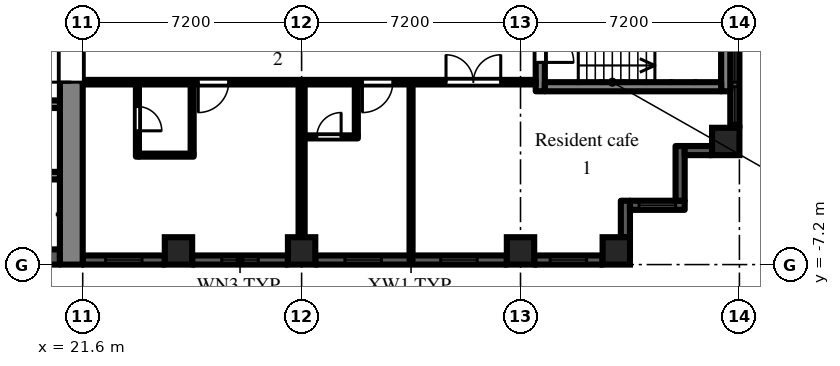
"""IFC4 building model, lengths in metres.
Left out: names, types, materials, properties, quantities, classifications, styles, units other than length and angle.
Written with IfcOpenShell. Run it as: python <this file> out.ifc"""

import sys

from ifc_helpers import new_model, si_unit, direction, frame, frame_2d, origin, origin_2d, place, context, subcontext, project, spatial, rectangle, extrude, element, fill, save


model = new_model("IFC4")
c1 = context("Model", 3, precision=1e-05, world=origin(), true_north=direction((0.0, 1.0)))
c2 = subcontext(c1, "Body", "Model", "MODEL_VIEW")
j1 = project(units=[si_unit("LENGTHUNIT", "METRE"), si_unit("PLANEANGLEUNIT", "RADIAN")], contexts=[c1])
p1 = place(None, origin())
s1 = spatial("IfcSite", under=j1, at=p1, CompositionType="ELEMENT")
p2 = place(p1, origin())
s2 = spatial("IfcBuilding", under=s1, at=p2, CompositionType="ELEMENT")
p3 = place(p2, frame((0.0, 0.0, 35.7)))
s3 = spatial("IfcBuildingStorey", under=s2, at=p3, CompositionType="ELEMENT", Elevation=35.7)
for number, where, z_axis, x_axis in (
    (1, (24.75, -6.75, 0.0), (0.0, 0.0, 1.0), (1.0, 0.0, 0.0)),
    (2, (28.8, -6.75, 0.0), (0.0, 0.0, 1.0), (1.0, 0.0, 0.0)),
    (3, (36.0, -6.75, 0.0), (0.0, 0.0, 1.0), (1.0, 0.0, 0.0)),
    (4, (39.15, -6.75, 0.0), (0.0, 0.0, 1.0), (1.0, 0.0, 0.0)),
    (5, (42.75, -3.15, 0.0), (0.0, 0.0, 1.0), (1.0, 0.0, 0.0)),
):
    element("IfcColumn", number, at=place(p3, frame(where, z_axis=z_axis, x_axis=x_axis)), inside=s3, PredefinedType="COLUMN", context=c2, shape_type="SweptSolid", body=[
        extrude(rectangle(XDim=0.9, YDim=0.9, at=origin_2d()), origin(), (0.0, 0.0, 1.0), 3.0),
    ])
p4 = place(p3, frame((21.6, -7.05, 0.0), z_axis=(0.0, 0.0, 1.0), x_axis=(1.0, 0.0, 0.0)))
e6 = element("IfcWall", 6, at=p4, inside=s3, PredefinedType="SOLIDWALL", context=c2, shape_type="SweptSolid", body=[
    extrude(rectangle(XDim=2.7, YDim=0.3, at=frame_2d((1.35, 0.0))), origin(), (0.0, 0.0, 1.0), 2.1),
])
p5 = place(p4, frame((0.75, 0.0, 0.2)))
e7 = element("IfcOpeningElement", 7, at=p5, cuts=e6, PredefinedType="OPENING", context=c2, shape_type="SweptSolid", body=[
    extrude(rectangle(XDim=1.2, YDim=1.85, at=frame_2d((0.6, 0.925))), frame((0.0, 0.16, 0.0), z_axis=(0.0, -1.0, 0.0), x_axis=(1.0, 0.0, 0.0)), (0.0, 0.0, 1.0), 0.32),
])
p6 = place(p3, frame((25.2, -7.05, 0.0), z_axis=(0.0, 0.0, 1.0), x_axis=(1.0, 0.0, 0.0)))
e8 = element("IfcWall", 8, at=p6, inside=s3, PredefinedType="SOLIDWALL", context=c2, shape_type="SweptSolid", body=[
    extrude(rectangle(XDim=3.15, YDim=0.3, at=frame_2d((1.575, 0.0))), origin(), (0.0, 0.0, 1.0), 2.1),
])
p7 = place(p6, frame((0.975, 0.0, 0.2)))
e9 = element("IfcOpeningElement", 9, at=p7, cuts=e8, PredefinedType="OPENING", context=c2, shape_type="SweptSolid", body=[
    extrude(rectangle(XDim=1.2, YDim=1.85, at=frame_2d((0.6, 0.925))), frame((0.0, 0.16, 0.0), z_axis=(0.0, -1.0, 0.0), x_axis=(1.0, 0.0, 0.0)), (0.0, 0.0, 1.0), 0.32),
])
p8 = place(p3, frame((29.25, -7.05, 0.0), z_axis=(0.0, 0.0, 1.0), x_axis=(1.0, 0.0, 0.0)))
e10 = element("IfcWall", 10, at=p8, inside=s3, PredefinedType="SOLIDWALL", context=c2, shape_type="SweptSolid", body=[
    extrude(rectangle(XDim=6.3, YDim=0.3, at=frame_2d((3.15, 0.0))), origin(), (0.0, 0.0, 1.0), 2.1),
])
p9 = place(p8, frame((0.975, 0.0, 0.2)))
e11 = element("IfcOpeningElement", 11, at=p9, cuts=e10, PredefinedType="OPENING", context=c2, shape_type="SweptSolid", body=[
    extrude(rectangle(XDim=1.2, YDim=1.85, at=frame_2d((0.6, 0.925))), frame((0.0, 0.16, 0.0), z_axis=(0.0, -1.0, 0.0), x_axis=(1.0, 0.0, 0.0)), (0.0, 0.0, 1.0), 0.32),
])
p10 = place(p8, frame((4.125, 0.0, 0.2)))
e12 = element("IfcOpeningElement", 12, at=p10, cuts=e10, PredefinedType="OPENING", context=c2, shape_type="SweptSolid", body=[
    extrude(rectangle(XDim=1.2, YDim=1.85, at=frame_2d((0.6, 0.925))), frame((0.0, 0.16, 0.0), z_axis=(0.0, -1.0, 0.0), x_axis=(1.0, 0.0, 0.0)), (0.0, 0.0, 1.0), 0.32),
])
p11 = place(p3, frame((36.45, -7.05, 0.0), z_axis=(0.0, 0.0, 1.0), x_axis=(1.0, 0.0, 0.0)))
e13 = element("IfcWall", 13, at=p11, inside=s3, PredefinedType="SOLIDWALL", context=c2, shape_type="SweptSolid", body=[
    extrude(rectangle(XDim=2.25, YDim=0.3, at=frame_2d((1.125, 0.0))), origin(), (0.0, 0.0, 1.0), 2.1),
])
p12 = place(p11, frame((0.525, 0.0, 0.2)))
e14 = element("IfcOpeningElement", 14, at=p12, cuts=e13, PredefinedType="OPENING", context=c2, shape_type="SweptSolid", body=[
    extrude(rectangle(XDim=1.2, YDim=1.85, at=frame_2d((0.6, 0.925))), frame((0.0, 0.16, 0.0), z_axis=(0.0, -1.0, 0.0), x_axis=(1.0, 0.0, 0.0)), (0.0, 0.0, 1.0), 0.32),
])
p13 = place(p3, frame((39.45, -6.3, 0.0), z_axis=(0.0, 0.0, 1.0), x_axis=(0.0, 1.0, 0.0)))
e15 = element("IfcWall", 15, at=p13, inside=s3, PredefinedType="SOLIDWALL", context=c2, shape_type="SweptSolid", body=[
    extrude(rectangle(XDim=1.2, YDim=0.3, at=frame_2d((0.6, 0.0))), origin(), (0.0, 0.0, 1.0), 2.575),
])
p14 = place(p3, frame((39.6, -5.25, 0.0), z_axis=(0.0, 0.0, 1.0), x_axis=(1.0, 0.0, 0.0)))
e16 = element("IfcWall", 16, at=p14, inside=s3, PredefinedType="SOLIDWALL", context=c2, shape_type="SweptSolid", body=[
    extrude(rectangle(XDim=1.8, YDim=0.3, at=frame_2d((0.9, 0.0))), origin(), (0.0, 0.0, 1.0), 2.575),
])
p15 = place(p14, frame((0.3, 0.0, 0.2)))
e17 = element("IfcOpeningElement", 17, at=p15, cuts=e16, PredefinedType="OPENING", context=c2, shape_type="SweptSolid", body=[
    extrude(rectangle(XDim=1.2, YDim=1.85, at=frame_2d((0.6, 0.925))), frame((0.0, 0.16, 0.0), z_axis=(0.0, -1.0, 0.0), x_axis=(1.0, 0.0, 0.0)), (0.0, 0.0, 1.0), 0.32),
])
p16 = place(p3, frame((41.25, -5.1, 0.0), z_axis=(0.0, 0.0, 1.0), x_axis=(0.0, 1.0, 0.0)))
e18 = element("IfcWall", 18, at=p16, inside=s3, PredefinedType="SOLIDWALL", context=c2, shape_type="SweptSolid", body=[
    extrude(rectangle(XDim=1.8, YDim=0.3, at=frame_2d((0.9, 0.0))), origin(), (0.0, 0.0, 1.0), 2.575),
])
p17 = place(p3, frame((41.4, -3.45, 0.0), z_axis=(0.0, 0.0, 1.0), x_axis=(1.0, 0.0, 0.0)))
e19 = element("IfcWall", 19, at=p17, inside=s3, PredefinedType="SOLIDWALL", context=c2, shape_type="SweptSolid", body=[
    extrude(rectangle(XDim=0.9, YDim=0.3, at=frame_2d((0.45, 0.0))), origin(), (0.0, 0.0, 1.0), 2.575),
])
p18 = place(p3, frame((43.05, -2.7, 0.0), z_axis=(0.0, 0.0, 1.0), x_axis=(0.0, 1.0, 0.0)))
e20 = element("IfcWall", 20, at=p18, inside=s3, PredefinedType="SOLIDWALL", context=c2, shape_type="SweptSolid", body=[
    extrude(rectangle(XDim=5.4, YDim=0.3, at=frame_2d((2.7, 0.0))), origin(), (0.0, 0.0, 1.0), 2.1),
])
p19 = place(p18, frame((1.5, 0.0, 0.2)))
e21 = element("IfcOpeningElement", 21, at=p19, cuts=e20, PredefinedType="OPENING", context=c2, shape_type="SweptSolid", body=[
    extrude(rectangle(XDim=2.4, YDim=1.85, at=frame_2d((1.2, 0.925))), frame((0.0, 0.16, 0.0), z_axis=(0.0, -1.0, 0.0), x_axis=(1.0, 0.0, 0.0)), (0.0, 0.0, 1.0), 0.32),
])
p20 = place(p18, frame((0.15, 0.0, 0.2)))
e22 = element("IfcOpeningElement", 22, at=p20, cuts=e20, PredefinedType="OPENING", context=c2, shape_type="SweptSolid", body=[
    extrude(rectangle(XDim=1.2, YDim=1.85, at=frame_2d((0.6, 0.925))), frame((0.0, 0.16, 0.0), z_axis=(0.0, -1.0, 0.0), x_axis=(1.0, 0.0, 0.0)), (0.0, 0.0, 1.0), 0.32),
])
p21 = place(p3, frame((21.225, -7.2, 0.0), z_axis=(0.0, 0.0, 1.0), x_axis=(0.0, 1.0, 0.0)))
e23 = element("IfcWall", 23, at=p21, inside=s3, PredefinedType="SHEAR", context=c2, shape_type="SweptSolid", body=[
    extrude(rectangle(XDim=14.4, YDim=0.75, at=frame_2d((7.2, 0.0))), origin(), (0.0, 0.0, 1.0), 2.575),
])
p22 = place(p21, frame((6.0, 0.0, 0.0)))
e24 = element("IfcOpeningElement", 24, at=p22, cuts=e23, PredefinedType="OPENING", context=c2, shape_type="SweptSolid", body=[
    extrude(rectangle(XDim=2.4, YDim=2.2, at=frame_2d((1.2, 1.1))), frame((0.0, 0.385, 0.0), z_axis=(0.0, -1.0, 0.0), x_axis=(1.0, 0.0, 0.0)), (0.0, 0.0, 1.0), 0.77),
])
p23 = place(p3, frame((7.9, -6.95, 0.0), z_axis=(0.0, 0.0, 1.0), x_axis=(1.0, 0.0, 0.0)))
e25 = element("IfcWall", 25, at=p23, inside=s3, PredefinedType="SHEAR", context=c2, shape_type="SweptSolid", body=[
    extrude(rectangle(XDim=12.95, YDim=0.5, at=frame_2d((6.475, 0.0))), origin(), (0.0, 0.0, 1.0), 2.575),
])
p24 = place(p3, frame((7.9, -1.925, 0.0), z_axis=(0.0, 0.0, 1.0), x_axis=(1.0, 0.0, 0.0)))
e26 = element("IfcWall", 26, at=p24, inside=s3, PredefinedType="SHEAR", context=c2, shape_type="SweptSolid", body=[
    extrude(rectangle(XDim=12.95, YDim=0.25, at=frame_2d((6.475, 0.0))), origin(), (0.0, 0.0, 1.0), 2.575),
])
p25 = place(p24, frame((4.825, 0.0, 0.0)))
e27 = element("IfcOpeningElement", 27, at=p25, cuts=e26, PredefinedType="OPENING", context=c2, shape_type="SweptSolid", body=[
    extrude(rectangle(XDim=1.1, YDim=2.1, at=frame_2d((0.55, 1.05))), frame((0.0, 0.135, 0.0), z_axis=(0.0, -1.0, 0.0), x_axis=(1.0, 0.0, 0.0)), (0.0, 0.0, 1.0), 0.27),
])
p26 = place(p24, frame((7.025, 0.0, 0.0)))
e28 = element("IfcOpeningElement", 28, at=p26, cuts=e26, PredefinedType="OPENING", context=c2, shape_type="SweptSolid", body=[
    extrude(rectangle(XDim=1.1, YDim=2.1, at=frame_2d((0.55, 1.05))), frame((0.0, 0.135, 0.0), z_axis=(0.0, -1.0, 0.0), x_axis=(1.0, 0.0, 0.0)), (0.0, 0.0, 1.0), 0.27),
])
p27 = place(p24, frame((9.225, 0.0, 0.0)))
e29 = element("IfcOpeningElement", 29, at=p27, cuts=e26, PredefinedType="OPENING", context=c2, shape_type="SweptSolid", body=[
    extrude(rectangle(XDim=1.1, YDim=2.1, at=frame_2d((0.55, 1.05))), frame((0.0, 0.135, 0.0), z_axis=(0.0, -1.0, 0.0), x_axis=(1.0, 0.0, 0.0)), (0.0, 0.0, 1.0), 0.27),
])
p28 = place(p24, frame((0.525, 0.0, 0.0)))
e30 = element("IfcOpeningElement", 30, at=p28, cuts=e26, PredefinedType="OPENING", context=c2, shape_type="SweptSolid", body=[
    extrude(rectangle(XDim=0.9, YDim=2.1, at=frame_2d((0.45, 1.05))), frame((0.0, 0.135, 0.0), z_axis=(0.0, -1.0, 0.0), x_axis=(1.0, 0.0, 0.0)), (0.0, 0.0, 1.0), 0.27),
])
p29 = place(p24, frame((2.625, 0.0, 0.0)))
e31 = element("IfcOpeningElement", 31, at=p29, cuts=e26, PredefinedType="OPENING", context=c2, shape_type="SweptSolid", body=[
    extrude(rectangle(XDim=1.1, YDim=2.1, at=frame_2d((0.55, 1.05))), frame((0.0, 0.135, 0.0), z_axis=(0.0, -1.0, 0.0), x_axis=(1.0, 0.0, 0.0)), (0.0, 0.0, 1.0), 0.27),
])
p30 = place(p3, frame((12.3, -4.275, 0.0), z_axis=(0.0, 0.0, 1.0), x_axis=(1.0, 0.0, 0.0)))
e32 = element("IfcWall", 32, at=p30, inside=s3, PredefinedType="SHEAR", context=c2, shape_type="SweptSolid", body=[
    extrude(rectangle(XDim=8.55, YDim=0.25, at=frame_2d((4.275, 0.0))), origin(), (0.0, 0.0, 1.0), 2.575),
])
p31 = place(p3, frame((36.65, -1.5, 0.0), z_axis=(0.0, 0.0, 1.0), x_axis=(0.0, 1.0, 0.0)))
e33 = element("IfcWall", 33, at=p31, inside=s3, PredefinedType="SHEAR", context=c2, shape_type="SweptSolid", body=[
    extrude(rectangle(XDim=3.0, YDim=0.3, at=frame_2d((1.5, 0.0))), origin(), (0.0, 0.0, 1.0), 2.575),
])
p32 = place(p31, frame((0.95, 0.0, 0.0)))
e34 = element("IfcOpeningElement", 34, at=p32, cuts=e33, PredefinedType="OPENING", context=c2, shape_type="SweptSolid", body=[
    extrude(rectangle(XDim=1.1, YDim=2.1, at=frame_2d((0.55, 1.05))), frame((0.0, 0.16, 0.0), z_axis=(0.0, -1.0, 0.0), x_axis=(1.0, 0.0, 0.0)), (0.0, 0.0, 1.0), 0.32),
])
p33 = place(p3, frame((42.75, -1.5, 0.0), z_axis=(0.0, 0.0, 1.0), x_axis=(0.0, 1.0, 0.0)))
e35 = element("IfcWall", 35, at=p33, inside=s3, PredefinedType="SHEAR", context=c2, shape_type="SweptSolid", body=[
    extrude(rectangle(XDim=3.0, YDim=0.3, at=frame_2d((1.5, 0.0))), origin(), (0.0, 0.0, 1.0), 2.575),
])
p34 = place(p3, frame((36.8, -1.35, 0.0), z_axis=(0.0, 0.0, 1.0), x_axis=(1.0, 0.0, 0.0)))
e36 = element("IfcWall", 36, at=p34, inside=s3, PredefinedType="SHEAR", context=c2, shape_type="SweptSolid", body=[
    extrude(rectangle(XDim=5.8, YDim=0.3, at=frame_2d((2.9, 0.0))), origin(), (0.0, 0.0, 1.0), 2.575),
])
p35 = place(p3, frame((21.6, -1.2, 0.0), z_axis=(0.0, 0.0, 1.0), x_axis=(1.0, 0.0, 0.0)))
e37 = element("IfcWall", 37, at=p35, inside=s3, PredefinedType="PARTITIONING", context=c2, shape_type="SweptSolid", body=[
    extrude(rectangle(XDim=14.9, YDim=0.15, at=frame_2d((7.45, 0.0))), origin(), (0.0, 0.0, 1.0), 2.575),
])
p36 = place(p35, frame((3.8, 0.0, 0.0)))
e38 = element("IfcOpeningElement", 38, at=p36, cuts=e37, PredefinedType="OPENING", context=c2, shape_type="SweptSolid", body=[
    extrude(rectangle(XDim=1.0, YDim=2.1, at=frame_2d((0.5, 1.05))), frame((0.0, 0.085, 0.0), z_axis=(0.0, -1.0, 0.0), x_axis=(1.0, 0.0, 0.0)), (0.0, 0.0, 1.0), 0.17),
])
p37 = place(p35, frame((9.2, 0.0, 0.0)))
e39 = element("IfcOpeningElement", 39, at=p37, cuts=e37, PredefinedType="OPENING", context=c2, shape_type="SweptSolid", body=[
    extrude(rectangle(XDim=1.0, YDim=2.1, at=frame_2d((0.5, 1.05))), frame((0.0, 0.085, 0.0), z_axis=(0.0, -1.0, 0.0), x_axis=(1.0, 0.0, 0.0)), (0.0, 0.0, 1.0), 0.17),
])
p38 = place(p35, frame((11.95, 0.0, 0.0)))
e40 = element("IfcOpeningElement", 40, at=p38, cuts=e37, PredefinedType="OPENING", context=c2, shape_type="SweptSolid", body=[
    extrude(rectangle(XDim=1.8, YDim=2.1, at=frame_2d((0.9, 1.05))), frame((0.0, 0.085, 0.0), z_axis=(0.0, -1.0, 0.0), x_axis=(1.0, 0.0, 0.0)), (0.0, 0.0, 1.0), 0.17),
])
p39 = place(p3, frame((23.4, -3.65, 0.0), z_axis=(0.0, 0.0, 1.0), x_axis=(0.0, 1.0, 0.0)))
e41 = element("IfcWall", 41, at=p39, inside=s3, PredefinedType="PARTITIONING", context=c2, shape_type="SweptSolid", body=[
    extrude(rectangle(XDim=2.375, YDim=0.1, at=frame_2d((1.188, 0.0))), origin(), (0.0, 0.0, 1.0), 2.575),
])
p40 = place(p39, frame((0.85, 0.0, 0.0)))
e42 = element("IfcOpeningElement", 42, at=p40, cuts=e41, PredefinedType="OPENING", context=c2, shape_type="SweptSolid", body=[
    extrude(rectangle(XDim=0.8, YDim=2.1, at=frame_2d((0.4, 1.05))), frame((0.0, 0.06, 0.0), z_axis=(0.0, -1.0, 0.0), x_axis=(1.0, 0.0, 0.0)), (0.0, 0.0, 1.0), 0.12),
])
p41 = place(p3, frame((23.45, -3.6, 0.0), z_axis=(0.0, 0.0, 1.0), x_axis=(1.0, 0.0, 0.0)))
e43 = element("IfcWall", 43, at=p41, inside=s3, PredefinedType="PARTITIONING", context=c2, shape_type="SweptSolid", body=[
    extrude(rectangle(XDim=1.8, YDim=0.1, at=frame_2d((0.9, 0.0))), origin(), (0.0, 0.0, 1.0), 2.575),
])
p42 = place(p3, frame((25.2, -3.55, 0.0), z_axis=(0.0, 0.0, 1.0), x_axis=(0.0, 1.0, 0.0)))
e44 = element("IfcWall", 44, at=p42, inside=s3, PredefinedType="PARTITIONING", context=c2, shape_type="SweptSolid", body=[
    extrude(rectangle(XDim=2.275, YDim=0.1, at=frame_2d((1.138, 0.0))), origin(), (0.0, 0.0, 1.0), 2.575),
])
p43 = place(p3, frame((28.8, -6.9, 0.0), z_axis=(0.0, 0.0, 1.0), x_axis=(0.0, 1.0, 0.0)))
e45 = element("IfcWall", 45, at=p43, inside=s3, PredefinedType="PARTITIONING", context=c2, shape_type="SweptSolid", body=[
    extrude(rectangle(XDim=5.625, YDim=0.2, at=frame_2d((2.812, 0.0))), origin(), (0.0, 0.0, 1.0), 2.575),
])
p44 = place(p3, frame((28.9, -3.0, 0.0), z_axis=(0.0, 0.0, 1.0), x_axis=(1.0, 0.0, 0.0)))
e46 = element("IfcWall", 46, at=p44, inside=s3, PredefinedType="PARTITIONING", context=c2, shape_type="SweptSolid", body=[
    extrude(rectangle(XDim=1.75, YDim=0.1, at=frame_2d((0.875, 0.0))), origin(), (0.0, 0.0, 1.0), 2.575),
])
p45 = place(p44, frame((0.4, 0.0, 0.0)))
e47 = element("IfcOpeningElement", 47, at=p45, cuts=e46, PredefinedType="OPENING", context=c2, shape_type="SweptSolid", body=[
    extrude(rectangle(XDim=0.8, YDim=2.1, at=frame_2d((0.4, 1.05))), frame((0.0, 0.06, 0.0), z_axis=(0.0, -1.0, 0.0), x_axis=(1.0, 0.0, 0.0)), (0.0, 0.0, 1.0), 0.12),
])
p46 = place(p3, frame((30.6, -2.95, 0.0), z_axis=(0.0, 0.0, 1.0), x_axis=(0.0, 1.0, 0.0)))
e48 = element("IfcWall", 48, at=p46, inside=s3, PredefinedType="PARTITIONING", context=c2, shape_type="SweptSolid", body=[
    extrude(rectangle(XDim=1.675, YDim=0.1, at=frame_2d((0.837, 0.0))), origin(), (0.0, 0.0, 1.0), 2.575),
])
p47 = place(p3, frame((32.4, -6.9, 0.0), z_axis=(0.0, 0.0, 1.0), x_axis=(0.0, 1.0, 0.0)))
e49 = element("IfcWall", 49, at=p47, inside=s3, PredefinedType="PARTITIONING", context=c2, shape_type="SweptSolid", body=[
    extrude(rectangle(XDim=5.625, YDim=0.1, at=frame_2d((2.812, 0.0))), origin(), (0.0, 0.0, 1.0), 2.575),
])
p48 = place(p5, origin())
e50 = element("IfcWindow", 50, at=p48, inside=s3, PartitioningType="SINGLE_PANEL", PredefinedType="WINDOW", context=c2, shape_type="SweptSolid", body=[
    extrude(rectangle(XDim=1.2, YDim=1.85, at=frame_2d((0.6, 0.925))), frame((0.0, 0.03, 0.0), z_axis=(0.0, -1.0, 0.0), x_axis=(1.0, 0.0, 0.0)), (0.0, 0.0, 1.0), 0.06),
])
fill(e7, e50)
p49 = place(p7, origin())
e51 = element("IfcWindow", 51, at=p49, inside=s3, PartitioningType="SINGLE_PANEL", PredefinedType="WINDOW", context=c2, shape_type="SweptSolid", body=[
    extrude(rectangle(XDim=1.2, YDim=1.85, at=frame_2d((0.6, 0.925))), frame((0.0, 0.03, 0.0), z_axis=(0.0, -1.0, 0.0), x_axis=(1.0, 0.0, 0.0)), (0.0, 0.0, 1.0), 0.06),
])
fill(e9, e51)
p50 = place(p9, origin())
e52 = element("IfcWindow", 52, at=p50, inside=s3, PartitioningType="SINGLE_PANEL", PredefinedType="WINDOW", context=c2, shape_type="SweptSolid", body=[
    extrude(rectangle(XDim=1.2, YDim=1.85, at=frame_2d((0.6, 0.925))), frame((0.0, 0.03, 0.0), z_axis=(0.0, -1.0, 0.0), x_axis=(1.0, 0.0, 0.0)), (0.0, 0.0, 1.0), 0.06),
])
fill(e11, e52)
p51 = place(p10, origin())
e53 = element("IfcWindow", 53, at=p51, inside=s3, PartitioningType="SINGLE_PANEL", PredefinedType="WINDOW", context=c2, shape_type="SweptSolid", body=[
    extrude(rectangle(XDim=1.2, YDim=1.85, at=frame_2d((0.6, 0.925))), frame((0.0, 0.03, 0.0), z_axis=(0.0, -1.0, 0.0), x_axis=(1.0, 0.0, 0.0)), (0.0, 0.0, 1.0), 0.06),
])
fill(e12, e53)
p52 = place(p12, origin())
e54 = element("IfcWindow", 54, at=p52, inside=s3, PartitioningType="SINGLE_PANEL", PredefinedType="WINDOW", context=c2, shape_type="SweptSolid", body=[
    extrude(rectangle(XDim=1.2, YDim=1.85, at=frame_2d((0.6, 0.925))), frame((0.0, 0.03, 0.0), z_axis=(0.0, -1.0, 0.0), x_axis=(1.0, 0.0, 0.0)), (0.0, 0.0, 1.0), 0.06),
])
fill(e14, e54)
p53 = place(p15, origin())
e55 = element("IfcWindow", 55, at=p53, inside=s3, PartitioningType="SINGLE_PANEL", PredefinedType="WINDOW", context=c2, shape_type="SweptSolid", body=[
    extrude(rectangle(XDim=1.2, YDim=1.85, at=frame_2d((0.6, 0.925))), frame((0.0, 0.03, 0.0), z_axis=(0.0, -1.0, 0.0), x_axis=(1.0, 0.0, 0.0)), (0.0, 0.0, 1.0), 0.06),
])
fill(e17, e55)
p54 = place(p19, origin())
e56 = element("IfcWindow", 56, at=p54, inside=s3, PartitioningType="SINGLE_PANEL", PredefinedType="WINDOW", context=c2, shape_type="SweptSolid", body=[
    extrude(rectangle(XDim=2.4, YDim=1.85, at=frame_2d((1.2, 0.925))), frame((0.0, 0.03, 0.0), z_axis=(0.0, -1.0, 0.0), x_axis=(1.0, 0.0, 0.0)), (0.0, 0.0, 1.0), 0.06),
])
fill(e21, e56)
p55 = place(p20, origin())
e57 = element("IfcWindow", 57, at=p55, inside=s3, PartitioningType="SINGLE_PANEL", PredefinedType="WINDOW", context=c2, shape_type="SweptSolid", body=[
    extrude(rectangle(XDim=1.2, YDim=1.85, at=frame_2d((0.6, 0.925))), frame((0.0, 0.03, 0.0), z_axis=(0.0, -1.0, 0.0), x_axis=(1.0, 0.0, 0.0)), (0.0, 0.0, 1.0), 0.06),
])
fill(e22, e57)
p56 = place(p22, origin())
e58 = element("IfcDoor", 58, at=p56, inside=s3, OperationType="DOUBLE_DOOR_DOUBLE_SWING", PredefinedType="DOOR", context=c2, shape_type="SweptSolid", body=[
    extrude(rectangle(XDim=2.4, YDim=2.2, at=frame_2d((1.2, 1.1))), frame((0.0, 0.025, 0.0), z_axis=(0.0, -1.0, 0.0), x_axis=(1.0, 0.0, 0.0)), (0.0, 0.0, 1.0), 0.05),
])
fill(e24, e58)
p57 = place(p32, frame((1.1, 0.0, 0.0), z_axis=(0.0, 0.0, 1.0), x_axis=(-1.0, 0.0, 0.0)))
e59 = element("IfcDoor", 59, at=p57, inside=s3, OperationType="SINGLE_SWING_RIGHT", PredefinedType="DOOR", context=c2, shape_type="SweptSolid", body=[
    extrude(rectangle(XDim=1.1, YDim=2.1, at=frame_2d((0.55, 1.05))), frame((0.0, 0.025, 0.0), z_axis=(0.0, -1.0, 0.0), x_axis=(1.0, 0.0, 0.0)), (0.0, 0.0, 1.0), 0.05),
])
fill(e34, e59)
p58 = place(p40, frame((0.8, 0.0, 0.0), z_axis=(0.0, 0.0, 1.0), x_axis=(-1.0, 0.0, 0.0)))
e60 = element("IfcDoor", 60, at=p58, inside=s3, OperationType="SINGLE_SWING_RIGHT", PredefinedType="DOOR", context=c2, shape_type="SweptSolid", body=[
    extrude(rectangle(XDim=0.8, YDim=2.1, at=frame_2d((0.4, 1.05))), frame((0.0, 0.025, 0.0), z_axis=(0.0, -1.0, 0.0), x_axis=(1.0, 0.0, 0.0)), (0.0, 0.0, 1.0), 0.05),
])
fill(e42, e60)
p59 = place(p36, frame((1.0, 0.0, 0.0), z_axis=(0.0, 0.0, 1.0), x_axis=(-1.0, 0.0, 0.0)))
e61 = element("IfcDoor", 61, at=p59, inside=s3, OperationType="SINGLE_SWING_RIGHT", PredefinedType="DOOR", context=c2, shape_type="SweptSolid", body=[
    extrude(rectangle(XDim=1.0, YDim=2.1, at=frame_2d((0.5, 1.05))), frame((0.0, 0.025, 0.0), z_axis=(0.0, -1.0, 0.0), x_axis=(1.0, 0.0, 0.0)), (0.0, 0.0, 1.0), 0.05),
])
fill(e38, e61)
p60 = place(p45, origin())
e62 = element("IfcDoor", 62, at=p60, inside=s3, OperationType="SINGLE_SWING_RIGHT", PredefinedType="DOOR", context=c2, shape_type="SweptSolid", body=[
    extrude(rectangle(XDim=0.8, YDim=2.1, at=frame_2d((0.4, 1.05))), frame((0.0, 0.025, 0.0), z_axis=(0.0, -1.0, 0.0), x_axis=(1.0, 0.0, 0.0)), (0.0, 0.0, 1.0), 0.05),
])
fill(e47, e62)
p61 = place(p37, frame((1.0, 0.0, 0.0), z_axis=(0.0, 0.0, 1.0), x_axis=(-1.0, 0.0, 0.0)))
e63 = element("IfcDoor", 63, at=p61, inside=s3, OperationType="SINGLE_SWING_RIGHT", PredefinedType="DOOR", context=c2, shape_type="SweptSolid", body=[
    extrude(rectangle(XDim=1.0, YDim=2.1, at=frame_2d((0.5, 1.05))), frame((0.0, 0.025, 0.0), z_axis=(0.0, -1.0, 0.0), x_axis=(1.0, 0.0, 0.0)), (0.0, 0.0, 1.0), 0.05),
])
fill(e39, e63)
p62 = place(p38, origin())
e64 = element("IfcDoor", 64, at=p62, inside=s3, OperationType="DOUBLE_DOOR_DOUBLE_SWING", PredefinedType="DOOR", context=c2, shape_type="SweptSolid", body=[
    extrude(rectangle(XDim=1.8, YDim=2.1, at=frame_2d((0.9, 1.05))), frame((0.0, 0.025, 0.0), z_axis=(0.0, -1.0, 0.0), x_axis=(1.0, 0.0, 0.0)), (0.0, 0.0, 1.0), 0.05),
])
fill(e40, e64)
save(model, sys.argv[1])
